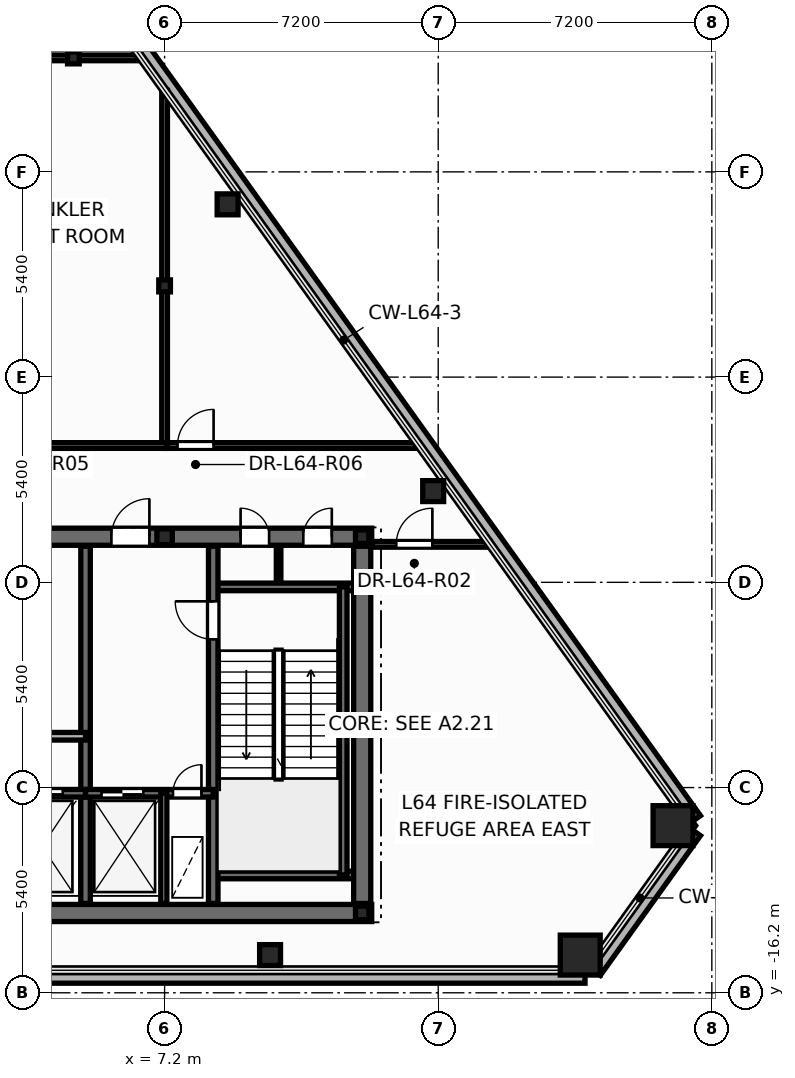
"""IFC4 building model, lengths in metres.
Left out: names, types, materials, properties, quantities, classifications, styles, units other than length and angle.
Written with IfcOpenShell. Run it as: python <this file> out.ifc"""

import sys

from ifc_helpers import new_model, si_unit, direction, frame, frame_2d, origin, origin_2d, place, context, subcontext, project, spatial, rectangle, hollow_rectangle, hollow_circle, i_section, extrude, element, fill, save


model = new_model("IFC4")
c1 = context("Model", 3, precision=1e-05, world=origin(), true_north=direction((0.0, 1.0)))
c2 = subcontext(c1, "Body", "Model", "MODEL_VIEW")
j1 = project(units=[si_unit("LENGTHUNIT", "METRE"), si_unit("PLANEANGLEUNIT", "RADIAN")], contexts=[c1])
p1 = place(None, origin())
s1 = spatial("IfcSite", under=j1, at=p1, CompositionType="ELEMENT")
p2 = place(p1, origin())
s2 = spatial("IfcBuilding", under=s1, at=p2, CompositionType="ELEMENT")
p3 = place(p2, frame((0.0, 0.0, 244.2)))
s3 = spatial("IfcBuildingStorey", under=s2, at=p3, CompositionType="ELEMENT", Elevation=244.2)
for number, where, z_axis, x_axis in (
    (1, (18.137, -15.208, 0.0), (0.0, 0.0, 1.0), (1.0, 0.0, 0.0)),
    (2, (20.579, -11.802, 0.0), (0.0, 0.0, 1.0), (1.0, 0.0, 0.0)),
):
    element("IfcColumn", number, at=place(p3, frame(where, z_axis=z_axis, x_axis=x_axis)), inside=s3, PredefinedType="COLUMN", context=c2, shape_type="SweptSolid", body=[
        extrude(hollow_rectangle(XDim=1.05, YDim=1.05, WallThickness=0.045, at=origin_2d()), origin(), (0.0, 0.0, 1.0), 4.8),
    ])
for number, where, z_axis, x_axis in (
    (3, (9.976, -15.208, 0.0), (0.0, 0.0, 1.0), (1.0, 0.0, 0.0)),
    (4, (14.268, -2.999, 0.0), (0.0, 0.0, 1.0), (1.0, 0.0, 0.0)),
    (5, (8.858, 4.546, 0.0), (0.0, 0.0, 1.0), (1.0, 0.0, 0.0)),
):
    element("IfcColumn", number, at=place(p3, frame(where, z_axis=z_axis, x_axis=x_axis)), inside=s3, PredefinedType="COLUMN", context=c2, shape_type="SweptSolid", body=[
        extrude(hollow_circle(Radius=0.275, WallThickness=0.024, at=origin_2d()), origin(), (0.0, 0.0, 1.0), 4.8),
    ])
for number, where, z_axis, x_axis in (
    (6, (12.4, -14.1, 0.0), (0.0, 0.0, 1.0), (1.0, 0.0, 0.0)),
    (7, (12.4, -4.2, 0.0), (0.0, 0.0, 1.0), (1.0, 0.0, 0.0)),
):
    element("IfcColumn", number, at=place(p3, frame(where, z_axis=z_axis, x_axis=x_axis)), inside=s3, PredefinedType="COLUMN", context=c2, shape_type="SweptSolid", body=[
        extrude(i_section(OverallWidth=0.352, OverallDepth=0.359, WebThickness=0.018, FlangeThickness=0.026, at=origin_2d()), origin(), (0.0, 0.0, 1.0), 4.8),
    ])
p4 = place(p3, frame((7.2, -4.2, 0.0), z_axis=(0.0, 0.0, 1.0), x_axis=(1.0, 0.0, 0.0)))
e8 = element("IfcColumn", 8, at=p4, inside=s3, PredefinedType="PILASTER", context=c2, shape_type="SweptSolid", body=[
    extrude(i_section(OverallWidth=0.405, OverallDepth=0.414, WebThickness=0.022, FlangeThickness=0.032, at=origin_2d()), origin(), (0.0, 0.0, 1.0), 4.8),
])
for number, where, z_axis, x_axis in (
    (9, (7.2, 2.4, 0.0), (0.0, 0.0, 1.0), (1.0, 0.0, 0.0)),
    (10, (4.8, 8.4, 0.0), (0.0, 0.0, 1.0), (1.0, 0.0, 0.0)),
):
    element("IfcColumn", number, at=place(p3, frame(where, z_axis=z_axis, x_axis=x_axis)), inside=s3, PredefinedType="COLUMN", context=c2, shape_type="SweptSolid", body=[
        extrude(i_section(OverallWidth=0.307, OverallDepth=0.314, WebThickness=0.012, FlangeThickness=0.019, at=origin_2d()), origin(), (0.0, 0.0, 1.0), 4.8),
    ])
p5 = place(p3, frame((-18.263, -15.768, -0.2), z_axis=(0.0, 0.0, 1.0), x_axis=(1.0, 0.0, 0.0)))
e11 = element("IfcWall", 11, at=p5, inside=s3, PredefinedType="PARAPET", context=c2, shape_type="SweptSolid", body=[
    extrude(rectangle(XDim=36.525, YDim=0.36, at=frame_2d((18.263, 0.0))), origin(), (0.0, 0.0, 1.0), 0.38),
])
p6 = place(p3, frame((18.519, -15.636, -0.2), z_axis=(0.0, 0.0, 1.0), x_axis=(0.582656829422, 0.81271829014, 0.0)))
e12 = element("IfcWall", 12, at=p6, inside=s3, PredefinedType="PARAPET", context=c2, shape_type="SweptSolid", body=[
    extrude(rectangle(XDim=4.523, YDim=0.36, at=frame_2d((2.261, 0.0))), origin(), (0.0, 0.0, 1.0), 0.38),
])
p7 = place(p3, frame((21.155, -11.644, -0.2), z_axis=(0.0, 0.0, 1.0), x_axis=(-0.582665985036, 0.812711726187, 0.0)))
e13 = element("IfcWall", 13, at=p7, inside=s3, PredefinedType="PARAPET", context=c2, shape_type="SweptSolid", body=[
    extrude(rectangle(XDim=31.279, YDim=0.36, at=frame_2d((15.639, 0.0))), origin(), (0.0, 0.0, 1.0), 0.38),
])
p8 = place(p3, frame((10.2, -5.52, 0.0), z_axis=(0.0, 0.0, 1.0), x_axis=(0.0, 1.0, 0.0)))
e14 = element("IfcWall", 14, at=p8, inside=s3, PredefinedType="PARTITIONING", context=c2, shape_type="SweptSolid", body=[
    extrude(rectangle(XDim=1.12, YDim=0.12, at=frame_2d((0.56, 0.0))), origin(), (0.0, 0.0, 1.0), 4.545),
])
p9 = place(p3, frame((-12.65, -14.1, 0.0), z_axis=(0.0, 0.0, 1.0), x_axis=(1.0, 0.0, 0.0)))
e15 = element("IfcWall", 15, at=p9, inside=s3, PredefinedType="SHEAR", context=c2, shape_type="SweptSolid", body=[
    extrude(rectangle(XDim=25.3, YDim=0.45, at=frame_2d((12.65, 0.0))), origin(), (0.0, 0.0, 1.0), 4.8),
])
p10 = place(p3, frame((-12.65, -4.2, 0.0), z_axis=(0.0, 0.0, 1.0), x_axis=(1.0, 0.0, 0.0)))
e16 = element("IfcWall", 16, at=p10, inside=s3, PredefinedType="SHEAR", context=c2, shape_type="SweptSolid", body=[
    extrude(rectangle(XDim=25.3, YDim=0.45, at=frame_2d((12.65, 0.0))), origin(), (0.0, 0.0, 1.0), 4.8),
])
p11 = place(p10, frame((1.85, 0.0, 0.0)))
e17 = element("IfcOpeningElement", 17, at=p11, cuts=e16, PredefinedType="OPENING", context=c2, shape_type="SweptSolid", body=[
    extrude(rectangle(XDim=0.756, YDim=2.054, at=frame_2d((0.375, 1.027))), frame((0.0, 0.235, 0.0), z_axis=(0.0, -1.0, 0.0), x_axis=(1.0, 0.0, 0.0)), (0.0, 0.0, 1.0), 0.47),
])
p12 = place(p10, frame((21.85, 0.0, 0.0)))
e18 = element("IfcOpeningElement", 18, at=p12, cuts=e16, PredefinedType="OPENING", context=c2, shape_type="SweptSolid", body=[
    extrude(rectangle(XDim=0.756, YDim=2.054, at=frame_2d((0.375, 1.027))), frame((0.0, 0.235, 0.0), z_axis=(0.0, -1.0, 0.0), x_axis=(1.0, 0.0, 0.0)), (0.0, 0.0, 1.0), 0.47),
])
p13 = place(p10, frame((23.5, 0.0, 0.0)))
e19 = element("IfcOpeningElement", 19, at=p13, cuts=e16, PredefinedType="OPENING", context=c2, shape_type="SweptSolid", body=[
    extrude(rectangle(XDim=0.756, YDim=2.054, at=frame_2d((0.375, 1.027))), frame((0.0, 0.235, 0.0), z_axis=(0.0, -1.0, 0.0), x_axis=(1.0, 0.0, 0.0)), (0.0, 0.0, 1.0), 0.47),
])
p14 = place(p10, frame((5.85, 0.0, 0.0)))
e20 = element("IfcOpeningElement", 20, at=p14, cuts=e16, PredefinedType="OPENING", context=c2, shape_type="SweptSolid", body=[
    extrude(rectangle(XDim=1.006, YDim=2.104, at=frame_2d((0.5, 1.052))), frame((0.0, 0.235, 0.0), z_axis=(0.0, -1.0, 0.0), x_axis=(1.0, 0.0, 0.0)), (0.0, 0.0, 1.0), 0.47),
])
p15 = place(p10, frame((10.35, 0.0, 0.0)))
e21 = element("IfcOpeningElement", 21, at=p15, cuts=e16, PredefinedType="OPENING", context=c2, shape_type="SweptSolid", body=[
    extrude(rectangle(XDim=1.406, YDim=2.154, at=frame_2d((0.7, 1.077))), frame((0.0, 0.235, 0.0), z_axis=(0.0, -1.0, 0.0), x_axis=(1.0, 0.0, 0.0)), (0.0, 0.0, 1.0), 0.47),
])
p16 = place(p10, frame((18.45, 0.0, 0.0)))
e22 = element("IfcOpeningElement", 22, at=p16, cuts=e16, PredefinedType="OPENING", context=c2, shape_type="SweptSolid", body=[
    extrude(rectangle(XDim=1.006, YDim=2.104, at=frame_2d((0.5, 1.052))), frame((0.0, 0.235, 0.0), z_axis=(0.0, -1.0, 0.0), x_axis=(1.0, 0.0, 0.0)), (0.0, 0.0, 1.0), 0.47),
])
for number, where, z_axis, x_axis in (
    (23, (8.48, -5.52, 0.0), (0.0, 0.0, 1.0), (1.0, 0.0, 0.0)),
    (24, (8.48, -13.1, 0.0), (0.0, 0.0, 1.0), (1.0, 0.0, 0.0)),
):
    element("IfcWall", number, at=place(p3, frame(where, z_axis=z_axis, x_axis=x_axis)), inside=s3, PredefinedType="SOLIDWALL", context=c2, shape_type="SweptSolid", body=[
        extrude(rectangle(XDim=3.87, YDim=0.2, at=frame_2d((1.935, 0.0))), origin(), (0.0, 0.0, 1.0), 4.8),
    ])
p17 = place(p3, frame((11.9, -13.1, 0.0), z_axis=(0.0, 0.0, 1.0), x_axis=(0.0, 1.0, 0.0)))
e25 = element("IfcWall", 25, at=p17, inside=s3, PredefinedType="SOLIDWALL", context=c2, shape_type="SweptSolid", body=[
    extrude(rectangle(XDim=7.58, YDim=0.2, at=frame_2d((3.79, 0.0))), origin(), (0.0, 0.0, 1.0), 4.8),
])
p18 = place(p3, frame((8.48, -13.85, 0.0), z_axis=(0.0, 0.0, 1.0), x_axis=(0.0, 1.0, 0.0)))
e26 = element("IfcWall", 26, at=p18, inside=s3, PredefinedType="SHEAR", context=c2, shape_type="SweptSolid", body=[
    extrude(rectangle(XDim=9.4, YDim=0.25, at=frame_2d((4.7, 0.0))), origin(), (0.0, 0.0, 1.0), 4.8),
])
p19 = place(p18, frame((6.95, 0.0, 0.0)))
e27 = element("IfcOpeningElement", 27, at=p19, cuts=e26, PredefinedType="OPENING", context=c2, shape_type="SweptSolid", body=[
    extrude(rectangle(XDim=1.006, YDim=2.104, at=frame_2d((0.5, 1.052))), frame((0.0, 0.135, 0.0), z_axis=(0.0, -1.0, 0.0), x_axis=(1.0, 0.0, 0.0)), (0.0, 0.0, 1.0), 0.27),
])
p20 = place(p3, frame((5.12, -13.85, 0.0), z_axis=(0.0, 0.0, 1.0), x_axis=(0.0, 1.0, 0.0)))
e28 = element("IfcWall", 28, at=p20, inside=s3, PredefinedType="SHEAR", context=c2, shape_type="SweptSolid", body=[
    extrude(rectangle(XDim=9.4, YDim=0.25, at=frame_2d((4.7, 0.0))), origin(), (0.0, 0.0, 1.0), 4.8),
])
p21 = place(p3, frame((-5.12, -10.95, 0.0), z_axis=(0.0, 0.0, 1.0), x_axis=(1.0, 0.0, 0.0)))
e29 = element("IfcWall", 29, at=p21, inside=s3, PredefinedType="SOLIDWALL", context=c2, shape_type="SweptSolid", body=[
    extrude(rectangle(XDim=10.24, YDim=0.2, at=frame_2d((5.12, 0.0))), origin(), (0.0, 0.0, 1.0), 4.8),
])
p22 = place(p21, frame((0.6, 0.0, 0.0)))
e30 = element("IfcOpeningElement", 30, at=p22, cuts=e29, PredefinedType="OPENING", context=c2, shape_type="SweptSolid", body=[
    extrude(rectangle(XDim=1.106, YDim=2.104, at=frame_2d((0.55, 1.052))), frame((0.0, 0.11, 0.0), z_axis=(0.0, -1.0, 0.0), x_axis=(1.0, 0.0, 0.0)), (0.0, 0.0, 1.0), 0.22),
])
p23 = place(p21, frame((2.67, 0.0, 0.0)))
e31 = element("IfcOpeningElement", 31, at=p23, cuts=e29, PredefinedType="OPENING", context=c2, shape_type="SweptSolid", body=[
    extrude(rectangle(XDim=1.106, YDim=2.104, at=frame_2d((0.55, 1.052))), frame((0.0, 0.11, 0.0), z_axis=(0.0, -1.0, 0.0), x_axis=(1.0, 0.0, 0.0)), (0.0, 0.0, 1.0), 0.22),
])
p24 = place(p21, frame((4.57, 0.0, 0.0)))
e32 = element("IfcOpeningElement", 32, at=p24, cuts=e29, PredefinedType="OPENING", context=c2, shape_type="SweptSolid", body=[
    extrude(rectangle(XDim=1.106, YDim=2.104, at=frame_2d((0.55, 1.052))), frame((0.0, 0.11, 0.0), z_axis=(0.0, -1.0, 0.0), x_axis=(1.0, 0.0, 0.0)), (0.0, 0.0, 1.0), 0.22),
])
p25 = place(p21, frame((6.47, 0.0, 0.0)))
e33 = element("IfcOpeningElement", 33, at=p25, cuts=e29, PredefinedType="OPENING", context=c2, shape_type="SweptSolid", body=[
    extrude(rectangle(XDim=1.106, YDim=2.104, at=frame_2d((0.55, 1.052))), frame((0.0, 0.11, 0.0), z_axis=(0.0, -1.0, 0.0), x_axis=(1.0, 0.0, 0.0)), (0.0, 0.0, 1.0), 0.22),
])
p26 = place(p21, frame((8.54, 0.0, 0.0)))
e34 = element("IfcOpeningElement", 34, at=p26, cuts=e29, PredefinedType="OPENING", context=c2, shape_type="SweptSolid", body=[
    extrude(rectangle(XDim=1.106, YDim=2.104, at=frame_2d((0.55, 1.052))), frame((0.0, 0.11, 0.0), z_axis=(0.0, -1.0, 0.0), x_axis=(1.0, 0.0, 0.0)), (0.0, 0.0, 1.0), 0.22),
])
p27 = place(p3, frame((5.12, -10.95, 0.0), z_axis=(0.0, 0.0, 1.0), x_axis=(1.0, 0.0, 0.0)))
e35 = element("IfcWall", 35, at=p27, inside=s3, PredefinedType="SOLIDWALL", context=c2, shape_type="SweptSolid", body=[
    extrude(rectangle(XDim=3.36, YDim=0.2, at=frame_2d((1.68, 0.0))), origin(), (0.0, 0.0, 1.0), 4.8),
])
p28 = place(p27, frame((0.42, 0.0, 0.0)))
e36 = element("IfcOpeningElement", 36, at=p28, cuts=e35, PredefinedType="OPENING", context=c2, shape_type="SweptSolid", body=[
    extrude(rectangle(XDim=1.106, YDim=2.104, at=frame_2d((0.55, 1.052))), frame((0.0, 0.11, 0.0), z_axis=(0.0, -1.0, 0.0), x_axis=(1.0, 0.0, 0.0)), (0.0, 0.0, 1.0), 0.22),
])
p29 = place(p27, frame((2.3, 0.0, 0.0)))
e37 = element("IfcOpeningElement", 37, at=p29, cuts=e35, PredefinedType="OPENING", context=c2, shape_type="SweptSolid", body=[
    extrude(rectangle(XDim=0.756, YDim=2.054, at=frame_2d((0.375, 1.027))), frame((0.0, 0.11, 0.0), z_axis=(0.0, -1.0, 0.0), x_axis=(1.0, 0.0, 0.0)), (0.0, 0.0, 1.0), 0.22),
])
p30 = place(p3, frame((7.18, -13.85, 0.0), z_axis=(0.0, 0.0, 1.0), x_axis=(0.0, 1.0, 0.0)))
e38 = element("IfcWall", 38, at=p30, inside=s3, PredefinedType="PARTITIONING", context=c2, shape_type="SweptSolid", body=[
    extrude(rectangle(XDim=2.9, YDim=0.16, at=frame_2d((1.45, 0.0))), origin(), (0.0, 0.0, 1.0), 3.77),
])
p31 = place(p3, frame((12.4, -13.85, 0.0), z_axis=(0.0, 0.0, 1.0), x_axis=(0.0, 1.0, 0.0)))
e39 = element("IfcWall", 39, at=p31, inside=s3, PredefinedType="SHEAR", context=c2, shape_type="SweptSolid", body=[
    extrude(rectangle(XDim=9.4, YDim=0.45, at=frame_2d((4.7, 0.0))), origin(), (0.0, 0.0, 1.0), 4.8),
])
p32 = place(p3, frame((2.88, -9.45, 0.0), z_axis=(0.0, 0.0, 1.0), x_axis=(1.0, 0.0, 0.0)))
e40 = element("IfcWall", 40, at=p32, inside=s3, PredefinedType="SOLIDWALL", context=c2, shape_type="SweptSolid", body=[
    extrude(rectangle(XDim=2.24, YDim=0.2, at=frame_2d((1.12, 0.0))), origin(), (0.0, 0.0, 1.0), 4.545),
])
p33 = place(p3, frame((7.2, -1.8, 0.0), z_axis=(0.0, 0.0, 1.0), x_axis=(0.0, 1.0, 0.0)))
e41 = element("IfcWall", 41, at=p33, inside=s3, PredefinedType="PARTITIONING", context=c2, shape_type="SweptSolid", body=[
    extrude(rectangle(XDim=9.346, YDim=0.15, at=frame_2d((4.673, 0.0))), origin(), (0.0, 0.0, 1.0), 2.485),
])
p34 = place(p3, frame((0.062, -1.8, 0.0), z_axis=(0.0, 0.0, 1.0), x_axis=(1.0, 0.0, 0.0)))
e42 = element("IfcWall", 42, at=p34, inside=s3, PredefinedType="PARTITIONING", context=c2, shape_type="SweptSolid", body=[
    extrude(rectangle(XDim=7.198, YDim=0.15, at=frame_2d((3.599, 0.0))), origin(), (0.0, 0.0, 1.0), 2.485),
])
p35 = place(p34, frame((0.277, 0.0, 0.0)))
e43 = element("IfcOpeningElement", 43, at=p35, cuts=e42, PredefinedType="OPENING", context=c2, shape_type="SweptSolid", body=[
    extrude(rectangle(XDim=0.956, YDim=2.104, at=frame_2d((0.475, 1.052))), frame((0.0, 0.085, 0.0), z_axis=(0.0, -1.0, 0.0), x_axis=(1.0, 0.0, 0.0)), (0.0, 0.0, 1.0), 0.17),
])
p36 = place(p3, frame((7.262, -1.8, 0.0), z_axis=(0.0, 0.0, 1.0), x_axis=(1.0, 0.0, 0.0)))
e44 = element("IfcWall", 44, at=p36, inside=s3, PredefinedType="PARTITIONING", context=c2, shape_type="SweptSolid", body=[
    extrude(rectangle(XDim=6.638, YDim=0.15, at=frame_2d((3.319, 0.0))), origin(), (0.0, 0.0, 1.0), 2.485),
])
p37 = place(p36, frame((0.278, 0.0, 0.0)))
e45 = element("IfcOpeningElement", 45, at=p37, cuts=e44, PredefinedType="OPENING", context=c2, shape_type="SweptSolid", body=[
    extrude(rectangle(XDim=0.956, YDim=2.104, at=frame_2d((0.475, 1.052))), frame((0.0, 0.085, 0.0), z_axis=(0.0, -1.0, 0.0), x_axis=(1.0, 0.0, 0.0)), (0.0, 0.0, 1.0), 0.17),
])
p38 = place(p3, frame((0.0, 8.4, 0.0), z_axis=(0.0, 0.0, 1.0), x_axis=(1.0, 0.0, 0.0)))
e46 = element("IfcWall", 46, at=p38, inside=s3, PredefinedType="PARTITIONING", context=c2, shape_type="SweptSolid", body=[
    extrude(rectangle(XDim=6.587, YDim=0.15, at=frame_2d((3.294, 0.0))), origin(), (0.0, 0.0, 1.0), 2.485),
])
p39 = place(p3, frame((12.652, -4.4, 0.0), z_axis=(0.0, 0.0, 1.0), x_axis=(1.0, 0.0, 0.0)))
e47 = element("IfcWall", 47, at=p39, inside=s3, PredefinedType="PARTITIONING", context=c2, shape_type="SweptSolid", body=[
    extrude(rectangle(XDim=3.112, YDim=0.15, at=frame_2d((1.556, 0.0))), origin(), (0.0, 0.0, 1.0), 2.485),
])
p40 = place(p39, frame((0.644, 0.0, 0.0)))
e48 = element("IfcOpeningElement", 48, at=p40, cuts=e47, PredefinedType="OPENING", context=c2, shape_type="SweptSolid", body=[
    extrude(rectangle(XDim=0.956, YDim=2.104, at=frame_2d((0.475, 1.052))), frame((0.0, 0.085, 0.0), z_axis=(0.0, -1.0, 0.0), x_axis=(1.0, 0.0, 0.0)), (0.0, 0.0, 1.0), 0.17),
])
p41 = place(p19, origin())
e49 = element("IfcDoor", 49, at=p41, inside=s3, OperationType="SINGLE_SWING_RIGHT", PredefinedType="DOOR", context=c2, shape_type="SweptSolid", body=[
    extrude(rectangle(XDim=1.0, YDim=2.1, at=frame_2d((0.5, 1.05))), frame((0.0, 0.025, 0.0), z_axis=(0.0, -1.0, 0.0), x_axis=(1.0, 0.0, 0.0)), (0.0, 0.0, 1.0), 0.05),
])
fill(e27, e49)
p42 = place(p28, origin())
e50 = element("IfcDoor", 50, at=p42, inside=s3, OperationType="DOUBLE_DOOR_SLIDING", PredefinedType="DOOR", context=c2, shape_type="SweptSolid", body=[
    extrude(rectangle(XDim=1.1, YDim=2.1, at=frame_2d((0.55, 1.05))), frame((0.0, 0.025, 0.0), z_axis=(0.0, -1.0, 0.0), x_axis=(1.0, 0.0, 0.0)), (0.0, 0.0, 1.0), 0.05),
])
fill(e36, e50)
p43 = place(p29, origin())
e51 = element("IfcDoor", 51, at=p43, inside=s3, OperationType="SINGLE_SWING_RIGHT", PredefinedType="DOOR", context=c2, shape_type="SweptSolid", body=[
    extrude(rectangle(XDim=0.75, YDim=2.05, at=frame_2d((0.375, 1.025))), frame((0.0, 0.025, 0.0), z_axis=(0.0, -1.0, 0.0), x_axis=(1.0, 0.0, 0.0)), (0.0, 0.0, 1.0), 0.05),
])
fill(e37, e51)
p44 = place(p26, origin())
e52 = element("IfcDoor", 52, at=p44, inside=s3, OperationType="DOUBLE_DOOR_SLIDING", PredefinedType="DOOR", context=c2, shape_type="SweptSolid", body=[
    extrude(rectangle(XDim=1.1, YDim=2.1, at=frame_2d((0.55, 1.05))), frame((0.0, 0.025, 0.0), z_axis=(0.0, -1.0, 0.0), x_axis=(1.0, 0.0, 0.0)), (0.0, 0.0, 1.0), 0.05),
])
fill(e34, e52)
p45 = place(p12, origin())
e53 = element("IfcDoor", 53, at=p45, inside=s3, OperationType="SINGLE_SWING_LEFT", PredefinedType="DOOR", context=c2, shape_type="SweptSolid", body=[
    extrude(rectangle(XDim=0.75, YDim=2.05, at=frame_2d((0.375, 1.025))), frame((0.0, 0.025, 0.0), z_axis=(0.0, -1.0, 0.0), x_axis=(1.0, 0.0, 0.0)), (0.0, 0.0, 1.0), 0.05),
])
fill(e18, e53)
p46 = place(p13, origin())
e54 = element("IfcDoor", 54, at=p46, inside=s3, OperationType="SINGLE_SWING_RIGHT", PredefinedType="DOOR", context=c2, shape_type="SweptSolid", body=[
    extrude(rectangle(XDim=0.75, YDim=2.05, at=frame_2d((0.375, 1.025))), frame((0.0, 0.025, 0.0), z_axis=(0.0, -1.0, 0.0), x_axis=(1.0, 0.0, 0.0)), (0.0, 0.0, 1.0), 0.05),
])
fill(e19, e54)
p47 = place(p16, origin())
e55 = element("IfcDoor", 55, at=p47, inside=s3, OperationType="SINGLE_SWING_RIGHT", PredefinedType="DOOR", context=c2, shape_type="SweptSolid", body=[
    extrude(rectangle(XDim=1.0, YDim=2.1, at=frame_2d((0.5, 1.05))), frame((0.0, 0.025, 0.0), z_axis=(0.0, -1.0, 0.0), x_axis=(1.0, 0.0, 0.0)), (0.0, 0.0, 1.0), 0.05),
])
fill(e22, e55)
p48 = place(p40, origin())
e56 = element("IfcDoor", 56, at=p48, inside=s3, OperationType="SINGLE_SWING_RIGHT", PredefinedType="DOOR", context=c2, shape_type="SweptSolid", body=[
    extrude(rectangle(XDim=0.95, YDim=2.1, at=frame_2d((0.475, 1.05))), frame((0.0, 0.025, 0.0), z_axis=(0.0, -1.0, 0.0), x_axis=(1.0, 0.0, 0.0)), (0.0, 0.0, 1.0), 0.05),
])
fill(e48, e56)
p49 = place(p37, origin())
e57 = element("IfcDoor", 57, at=p49, inside=s3, OperationType="SINGLE_SWING_RIGHT", PredefinedType="DOOR", context=c2, shape_type="SweptSolid", body=[
    extrude(rectangle(XDim=0.95, YDim=2.1, at=frame_2d((0.475, 1.05))), frame((0.0, 0.025, 0.0), z_axis=(0.0, -1.0, 0.0), x_axis=(1.0, 0.0, 0.0)), (0.0, 0.0, 1.0), 0.05),
])
fill(e45, e57)
save(model, sys.argv[1])
